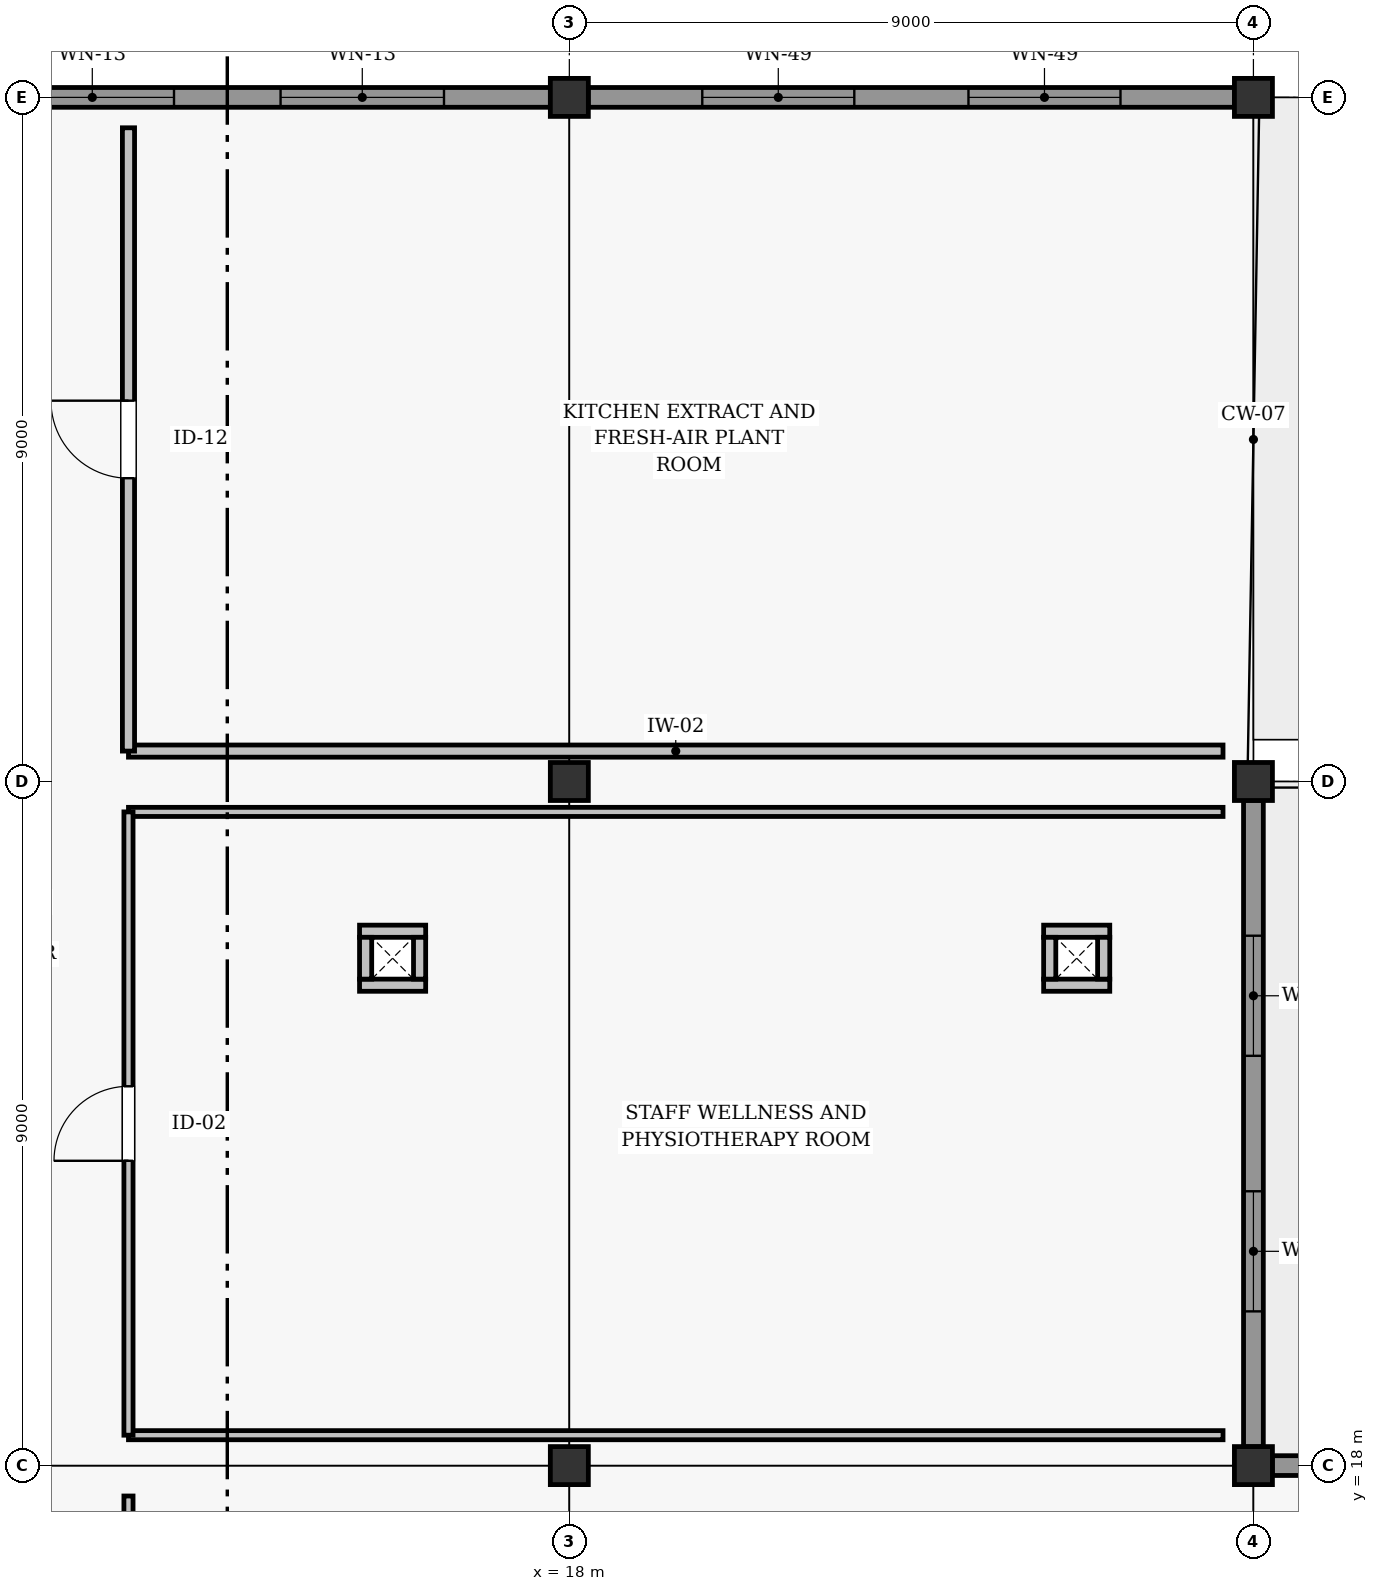
"""IFC4 building model, lengths in metres.
Left out: names, types, materials, properties, quantities, classifications, styles, units other than length and angle.
Written with IfcOpenShell. Run it as: python <this file> out.ifc"""

import sys

from ifc_helpers import new_model, si_unit, direction, frame, frame_2d, origin, origin_2d, place, context, subcontext, project, spatial, rectangle, extrude, element, fill, save


model = new_model("IFC4")
c1 = context("Model", 3, precision=1e-05, world=origin(), true_north=direction((0.0, 1.0)))
c2 = subcontext(c1, "Body", "Model", "MODEL_VIEW")
j1 = project(units=[si_unit("LENGTHUNIT", "METRE"), si_unit("PLANEANGLEUNIT", "RADIAN")], contexts=[c1])
p1 = place(None, origin())
s1 = spatial("IfcSite", under=j1, at=p1, CompositionType="ELEMENT")
p2 = place(p1, origin())
s2 = spatial("IfcBuilding", under=s1, at=p2, CompositionType="ELEMENT")
p3 = place(p2, frame((0.0, 0.0, 12.0)))
s3 = spatial("IfcBuildingStorey", under=s2, at=p3, CompositionType="ELEMENT", Elevation=12.0)
for number, where, z_axis, x_axis in (
    (1, (18.0, 18.0, 0.0), (0.0, 0.0, 1.0), (1.0, 0.0, 0.0)),
    (2, (18.0, 27.0, 0.0), (0.0, 0.0, 1.0), (1.0, 0.0, 0.0)),
    (3, (18.0, 36.0, 0.0), (0.0, 0.0, 1.0), (1.0, 0.0, 0.0)),
    (4, (27.0, 18.0, 0.0), (0.0, 0.0, 1.0), (1.0, 0.0, 0.0)),
    (5, (27.0, 27.0, 0.0), (0.0, 0.0, 1.0), (1.0, 0.0, 0.0)),
    (6, (27.0, 36.0, 0.0), (0.0, 0.0, 1.0), (1.0, 0.0, 0.0)),
):
    element("IfcColumn", number, at=place(p3, frame(where, z_axis=z_axis, x_axis=x_axis)), inside=s3, PredefinedType="COLUMN", context=c2, shape_type="SweptSolid", body=[
        extrude(rectangle(XDim=0.5, YDim=0.5, at=origin_2d()), origin(), (0.0, 0.0, 1.0), 3.0),
    ])
p4 = place(p3, frame((27.248, 18.0, 0.0), z_axis=(0.0, 0.0, 1.0), x_axis=(1.0, 0.0, 0.0)))
e7 = element("IfcWall", 7, at=p4, inside=s3, PredefinedType="SOLIDWALL", context=c2, shape_type="SweptSolid", body=[
    extrude(rectangle(XDim=8.504, YDim=0.26, at=frame_2d((4.252, 0.0))), origin(), (0.0, 0.0, 1.0), 2.262),
])
p5 = place(p4, frame((3.562, 0.0, 0.0)))
e8 = element("IfcOpeningElement", 8, at=p5, cuts=e7, PredefinedType="OPENING", context=c2, shape_type="SweptSolid", body=[
    extrude(rectangle(XDim=1.38, YDim=2.04, at=frame_2d((0.69, 1.02))), frame((0.0, 0.14, 0.0), z_axis=(0.0, -1.0, 0.0), x_axis=(1.0, 0.0, 0.0)), (0.0, 0.0, 1.0), 0.28),
])
p6 = place(p3, frame((9.248, 36.0, 0.0), z_axis=(0.0, 0.0, 1.0), x_axis=(1.0, 0.0, 0.0)))
e9 = element("IfcWall", 9, at=p6, inside=s3, PredefinedType="SOLIDWALL", context=c2, shape_type="SweptSolid", body=[
    extrude(rectangle(XDim=8.504, YDim=0.26, at=frame_2d((4.252, 0.0))), origin(), (0.0, 0.0, 1.0), 2.262),
])
p7 = place(p6, frame((1.401, 0.0, 0.96)))
e10 = element("IfcOpeningElement", 10, at=p7, cuts=e9, PredefinedType="OPENING", context=c2, shape_type="SweptSolid", body=[
    extrude(rectangle(XDim=2.15, YDim=1.12, at=frame_2d((1.075, 0.56))), frame((0.0, 0.14, 0.0), z_axis=(0.0, -1.0, 0.0), x_axis=(1.0, 0.0, 0.0)), (0.0, 0.0, 1.0), 0.28),
])
p8 = place(p6, frame((4.953, 0.0, 0.96)))
e11 = element("IfcOpeningElement", 11, at=p8, cuts=e9, PredefinedType="OPENING", context=c2, shape_type="SweptSolid", body=[
    extrude(rectangle(XDim=2.15, YDim=1.12, at=frame_2d((1.075, 0.56))), frame((0.0, 0.14, 0.0), z_axis=(0.0, -1.0, 0.0), x_axis=(1.0, 0.0, 0.0)), (0.0, 0.0, 1.0), 0.28),
])
p9 = place(p3, frame((18.248, 36.0, 0.0), z_axis=(0.0, 0.0, 1.0), x_axis=(1.0, 0.0, 0.0)))
e12 = element("IfcWall", 12, at=p9, inside=s3, PredefinedType="SOLIDWALL", context=c2, shape_type="SweptSolid", body=[
    extrude(rectangle(XDim=8.504, YDim=0.26, at=frame_2d((4.252, 0.0))), origin(), (0.0, 0.0, 1.0), 2.302),
])
p10 = place(p9, frame((1.501, 0.0, 1.04)))
e13 = element("IfcOpeningElement", 13, at=p10, cuts=e12, PredefinedType="OPENING", context=c2, shape_type="SweptSolid", body=[
    extrude(rectangle(XDim=2.0, YDim=1.08, at=frame_2d((1.0, 0.54))), frame((0.0, 0.14, 0.0), z_axis=(0.0, -1.0, 0.0), x_axis=(1.0, 0.0, 0.0)), (0.0, 0.0, 1.0), 0.28),
])
p11 = place(p9, frame((5.003, 0.0, 1.04)))
e14 = element("IfcOpeningElement", 14, at=p11, cuts=e12, PredefinedType="OPENING", context=c2, shape_type="SweptSolid", body=[
    extrude(rectangle(XDim=2.0, YDim=1.08, at=frame_2d((1.0, 0.54))), frame((0.0, 0.14, 0.0), z_axis=(0.0, -1.0, 0.0), x_axis=(1.0, 0.0, 0.0)), (0.0, 0.0, 1.0), 0.28),
])
p12 = place(p3, frame((27.0, 18.248, 0.0), z_axis=(0.0, 0.0, 1.0), x_axis=(0.0, 1.0, 0.0)))
e15 = element("IfcWall", 15, at=p12, inside=s3, PredefinedType="SOLIDWALL", context=c2, shape_type="SweptSolid", body=[
    extrude(rectangle(XDim=8.504, YDim=0.26, at=frame_2d((4.252, 0.0))), origin(), (0.0, 0.0, 1.0), 2.302),
])
p13 = place(p12, frame((1.781, 0.0, 0.52)))
e16 = element("IfcOpeningElement", 16, at=p13, cuts=e15, PredefinedType="OPENING", context=c2, shape_type="SweptSolid", body=[
    extrude(rectangle(XDim=1.58, YDim=1.6, at=frame_2d((0.79, 0.8))), frame((0.0, 0.14, 0.0), z_axis=(0.0, -1.0, 0.0), x_axis=(1.0, 0.0, 0.0)), (0.0, 0.0, 1.0), 0.28),
])
p14 = place(p12, frame((5.143, 0.0, 0.52)))
e17 = element("IfcOpeningElement", 17, at=p14, cuts=e15, PredefinedType="OPENING", context=c2, shape_type="SweptSolid", body=[
    extrude(rectangle(XDim=1.58, YDim=1.6, at=frame_2d((0.79, 0.8))), frame((0.0, 0.14, 0.0), z_axis=(0.0, -1.0, 0.0), x_axis=(1.0, 0.0, 0.0)), (0.0, 0.0, 1.0), 0.28),
])
for number, where, z_axis, x_axis in (
    (18, (15.24, 24.32, 0.0), (0.0, 0.0, 1.0), (1.0, 0.0, 0.0)),
    (19, (15.24, 25.03, 0.0), (0.0, 0.0, 1.0), (1.0, 0.0, 0.0)),
):
    element("IfcWall", number, at=place(p3, frame(where, z_axis=z_axis, x_axis=x_axis)), inside=s3, PredefinedType="PARTITIONING", context=c2, shape_type="SweptSolid", body=[
        extrude(rectangle(XDim=0.87, YDim=0.16, at=frame_2d((0.435, 0.0))), origin(), (0.0, 0.0, 1.0), 2.75),
    ])
for number, where, z_axis, x_axis in (
    (20, (15.32, 24.4, 0.0), (0.0, 0.0, 1.0), (0.0, 1.0, 0.0)),
    (21, (16.03, 24.4, 0.0), (0.0, 0.0, 1.0), (0.0, 1.0, 0.0)),
):
    element("IfcWall", number, at=place(p3, frame(where, z_axis=z_axis, x_axis=x_axis)), inside=s3, PredefinedType="PARTITIONING", context=c2, shape_type="SweptSolid", body=[
        extrude(rectangle(XDim=0.55, YDim=0.16, at=frame_2d((0.275, 0.0))), origin(), (0.0, 0.0, 1.0), 2.75),
    ])
for number, where, z_axis, x_axis in (
    (22, (24.24, 24.32, 0.0), (0.0, 0.0, 1.0), (1.0, 0.0, 0.0)),
    (23, (24.24, 25.03, 0.0), (0.0, 0.0, 1.0), (1.0, 0.0, 0.0)),
):
    element("IfcWall", number, at=place(p3, frame(where, z_axis=z_axis, x_axis=x_axis)), inside=s3, PredefinedType="PARTITIONING", context=c2, shape_type="SweptSolid", body=[
        extrude(rectangle(XDim=0.87, YDim=0.16, at=frame_2d((0.435, 0.0))), origin(), (0.0, 0.0, 1.0), 2.75),
    ])
for number, where, z_axis, x_axis in (
    (24, (24.32, 24.4, 0.0), (0.0, 0.0, 1.0), (0.0, 1.0, 0.0)),
    (25, (25.03, 24.4, 0.0), (0.0, 0.0, 1.0), (0.0, 1.0, 0.0)),
):
    element("IfcWall", number, at=place(p3, frame(where, z_axis=z_axis, x_axis=x_axis)), inside=s3, PredefinedType="PARTITIONING", context=c2, shape_type="SweptSolid", body=[
        extrude(rectangle(XDim=0.55, YDim=0.16, at=frame_2d((0.275, 0.0))), origin(), (0.0, 0.0, 1.0), 2.75),
    ])
p15 = place(p3, frame((12.2, 12.2, 0.0), z_axis=(0.0, 0.0, 1.0), x_axis=(0.0, 1.0, 0.0)))
e26 = element("IfcWall", 26, at=p15, inside=s3, PredefinedType="PARTITIONING", context=c2, shape_type="SweptSolid", body=[
    extrude(rectangle(XDim=5.4, YDim=0.12, at=frame_2d((2.7, 0.0))), origin(), (0.0, 0.0, 1.0), 2.75),
])
for number, where, z_axis, x_axis in (
    (27, (12.2, 18.4, 0.0), (0.0, 0.0, 1.0), (1.0, 0.0, 0.0)),
    (28, (12.2, 26.6, 0.0), (0.0, 0.0, 1.0), (1.0, 0.0, 0.0)),
):
    element("IfcWall", number, at=place(p3, frame(where, z_axis=z_axis, x_axis=x_axis)), inside=s3, PredefinedType="PARTITIONING", context=c2, shape_type="SweptSolid", body=[
        extrude(rectangle(XDim=14.4, YDim=0.12, at=frame_2d((7.2, 0.0))), origin(), (0.0, 0.0, 1.0), 2.245),
    ])
p16 = place(p3, frame((12.2, 18.4, 0.0), z_axis=(0.0, 0.0, 1.0), x_axis=(0.0, 1.0, 0.0)))
e29 = element("IfcWall", 29, at=p16, inside=s3, PredefinedType="PARTITIONING", context=c2, shape_type="SweptSolid", body=[
    extrude(rectangle(XDim=8.2, YDim=0.12, at=frame_2d((4.1, 0.0))), origin(), (0.0, 0.0, 1.0), 2.75),
])
p17 = place(p16, frame((3.61, 0.0, 0.0)))
e30 = element("IfcOpeningElement", 30, at=p17, cuts=e29, PredefinedType="OPENING", context=c2, shape_type="SweptSolid", body=[
    extrude(rectangle(XDim=0.98, YDim=2.08, at=frame_2d((0.49, 1.04))), frame((0.0, 0.07, 0.0), z_axis=(0.0, -1.0, 0.0), x_axis=(1.0, 0.0, 0.0)), (0.0, 0.0, 1.0), 0.14),
])
p18 = place(p3, frame((12.2, 27.4, 0.0), z_axis=(0.0, 0.0, 1.0), x_axis=(1.0, 0.0, 0.0)))
e31 = element("IfcWall", 31, at=p18, inside=s3, PredefinedType="PARTITIONING", context=c2, shape_type="SweptSolid", body=[
    extrude(rectangle(XDim=14.4, YDim=0.16, at=frame_2d((7.2, 0.0))), origin(), (0.0, 0.0, 1.0), 2.245),
])
p19 = place(p3, frame((12.2, 27.4, 0.0), z_axis=(0.0, 0.0, 1.0), x_axis=(0.0, 1.0, 0.0)))
e32 = element("IfcWall", 32, at=p19, inside=s3, PredefinedType="PARTITIONING", context=c2, shape_type="SweptSolid", body=[
    extrude(rectangle(XDim=8.2, YDim=0.16, at=frame_2d((4.1, 0.0))), origin(), (0.0, 0.0, 1.0), 2.75),
])
p20 = place(p19, frame((3.59, 0.0, 0.0)))
e33 = element("IfcOpeningElement", 33, at=p20, cuts=e32, PredefinedType="OPENING", context=c2, shape_type="SweptSolid", body=[
    extrude(rectangle(XDim=1.02, YDim=2.1, at=frame_2d((0.51, 1.05))), frame((0.0, 0.09, 0.0), z_axis=(0.0, -1.0, 0.0), x_axis=(1.0, 0.0, 0.0)), (0.0, 0.0, 1.0), 0.18),
])
p21 = place(p7, origin())
e34 = element("IfcWindow", 34, at=p21, inside=s3, PartitioningType="SINGLE_PANEL", PredefinedType="WINDOW", context=c2, shape_type="SweptSolid", body=[
    extrude(rectangle(XDim=2.15, YDim=1.12, at=frame_2d((1.075, 0.56))), frame((0.0, 0.03, 0.0), z_axis=(0.0, -1.0, 0.0), x_axis=(1.0, 0.0, 0.0)), (0.0, 0.0, 1.0), 0.06),
])
fill(e10, e34)
p22 = place(p8, origin())
e35 = element("IfcWindow", 35, at=p22, inside=s3, PartitioningType="SINGLE_PANEL", PredefinedType="WINDOW", context=c2, shape_type="SweptSolid", body=[
    extrude(rectangle(XDim=2.15, YDim=1.12, at=frame_2d((1.075, 0.56))), frame((0.0, 0.03, 0.0), z_axis=(0.0, -1.0, 0.0), x_axis=(1.0, 0.0, 0.0)), (0.0, 0.0, 1.0), 0.06),
])
fill(e11, e35)
p23 = place(p10, origin())
e36 = element("IfcWindow", 36, at=p23, inside=s3, PartitioningType="SINGLE_PANEL", PredefinedType="WINDOW", context=c2, shape_type="SweptSolid", body=[
    extrude(rectangle(XDim=2.0, YDim=1.08, at=frame_2d((1.0, 0.54))), frame((0.0, 0.03, 0.0), z_axis=(0.0, -1.0, 0.0), x_axis=(1.0, 0.0, 0.0)), (0.0, 0.0, 1.0), 0.06),
])
fill(e13, e36)
p24 = place(p11, origin())
e37 = element("IfcWindow", 37, at=p24, inside=s3, PartitioningType="SINGLE_PANEL", PredefinedType="WINDOW", context=c2, shape_type="SweptSolid", body=[
    extrude(rectangle(XDim=2.0, YDim=1.08, at=frame_2d((1.0, 0.54))), frame((0.0, 0.03, 0.0), z_axis=(0.0, -1.0, 0.0), x_axis=(1.0, 0.0, 0.0)), (0.0, 0.0, 1.0), 0.06),
])
fill(e14, e37)
p25 = place(p13, origin())
e38 = element("IfcWindow", 38, at=p25, inside=s3, PartitioningType="SINGLE_PANEL", PredefinedType="WINDOW", context=c2, shape_type="SweptSolid", body=[
    extrude(rectangle(XDim=1.58, YDim=1.6, at=frame_2d((0.79, 0.8))), frame((0.0, 0.03, 0.0), z_axis=(0.0, -1.0, 0.0), x_axis=(1.0, 0.0, 0.0)), (0.0, 0.0, 1.0), 0.06),
])
fill(e16, e38)
p26 = place(p14, origin())
e39 = element("IfcWindow", 39, at=p26, inside=s3, PartitioningType="SINGLE_PANEL", PredefinedType="WINDOW", context=c2, shape_type="SweptSolid", body=[
    extrude(rectangle(XDim=1.58, YDim=1.6, at=frame_2d((0.79, 0.8))), frame((0.0, 0.03, 0.0), z_axis=(0.0, -1.0, 0.0), x_axis=(1.0, 0.0, 0.0)), (0.0, 0.0, 1.0), 0.06),
])
fill(e17, e39)
p27 = place(p17, origin())
e40 = element("IfcDoor", 40, at=p27, inside=s3, OperationType="SINGLE_SWING_LEFT", PredefinedType="DOOR", context=c2, shape_type="SweptSolid", body=[
    extrude(rectangle(XDim=0.98, YDim=2.08, at=frame_2d((0.49, 1.04))), frame((0.0, 0.025, 0.0), z_axis=(0.0, -1.0, 0.0), x_axis=(1.0, 0.0, 0.0)), (0.0, 0.0, 1.0), 0.05),
])
fill(e30, e40)
p28 = place(p20, origin())
e41 = element("IfcDoor", 41, at=p28, inside=s3, OperationType="SINGLE_SWING_RIGHT", PredefinedType="DOOR", context=c2, shape_type="SweptSolid", body=[
    extrude(rectangle(XDim=1.02, YDim=2.1, at=frame_2d((0.51, 1.05))), frame((0.0, 0.025, 0.0), z_axis=(0.0, -1.0, 0.0), x_axis=(1.0, 0.0, 0.0)), (0.0, 0.0, 1.0), 0.05),
])
fill(e33, e41)
save(model, sys.argv[1])
